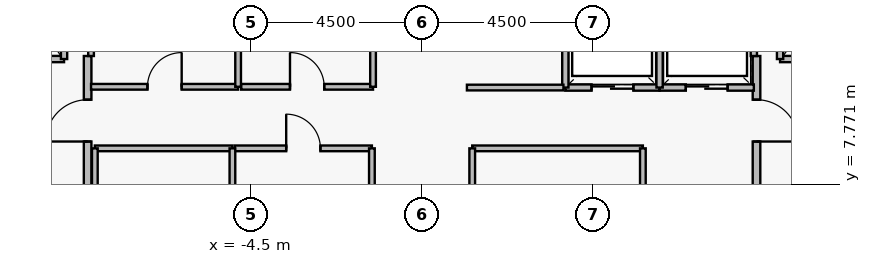
"""IFC4 building model, lengths in metres.
Left out: names, types, materials, properties, quantities, classifications, styles, units other than length and angle.
Written with IfcOpenShell. Run it as: python <this file> out.ifc"""

import sys

from ifc_helpers import new_model, si_unit, direction, frame, frame_2d, origin, place, context, subcontext, project, spatial, rectangle, extrude, element, fill, save


model = new_model("IFC4")
c1 = context("Model", 3, precision=1e-05, world=origin(), true_north=direction((0.0, 1.0)))
c2 = subcontext(c1, "Body", "Model", "MODEL_VIEW")
j1 = project(units=[si_unit("LENGTHUNIT", "METRE"), si_unit("PLANEANGLEUNIT", "RADIAN")], contexts=[c1])
p1 = place(None, origin())
s1 = spatial("IfcSite", under=j1, at=p1, CompositionType="ELEMENT")
p2 = place(p1, origin())
s2 = spatial("IfcBuilding", under=s1, at=p2, CompositionType="ELEMENT")
p3 = place(p2, frame((0.0, 0.0, 265.55)))
s3 = spatial("IfcBuildingStorey", under=s2, at=p3, CompositionType="ELEMENT", Elevation=265.55)
p4 = place(p3, frame((-8.8, 5.05, 0.0), z_axis=(0.0, 0.0, 1.0), x_axis=(0.0, 1.0, 0.0)))
e1 = element("IfcWall", 1, at=p4, inside=s3, PredefinedType="PARTITIONING", context=c2, shape_type="SweptSolid", body=[
    extrude(rectangle(XDim=6.1, YDim=0.2, at=frame_2d((3.05, 0.0))), origin(), (0.0, 0.0, 1.0), 3.48),
])
p5 = place(p4, frame((0.25, 0.0, 0.0)))
e2 = element("IfcOpeningElement", 2, at=p5, cuts=e1, PredefinedType="OPENING", context=c2, shape_type="SweptSolid", body=[
    extrude(rectangle(XDim=1.1, YDim=2.2, at=frame_2d((0.55, 1.1))), frame((0.0, 0.11, 0.0), z_axis=(0.0, -1.0, 0.0), x_axis=(1.0, 0.0, 0.0)), (0.0, 0.0, 1.0), 0.22),
])
p6 = place(p4, frame((3.85, 0.0, 0.0)))
e3 = element("IfcOpeningElement", 3, at=p6, cuts=e1, PredefinedType="OPENING", context=c2, shape_type="SweptSolid", body=[
    extrude(rectangle(XDim=1.1, YDim=2.2, at=frame_2d((0.55, 1.1))), frame((0.0, 0.11, 0.0), z_axis=(0.0, -1.0, 0.0), x_axis=(1.0, 0.0, 0.0)), (0.0, 0.0, 1.0), 0.22),
])
p7 = place(p3, frame((8.8, 11.15, 0.0), z_axis=(0.0, 0.0, 1.0), x_axis=(0.0, -1.0, 0.0)))
e4 = element("IfcWall", 4, at=p7, inside=s3, PredefinedType="PARTITIONING", context=c2, shape_type="SweptSolid", body=[
    extrude(rectangle(XDim=6.1, YDim=0.2, at=frame_2d((3.05, 0.0))), origin(), (0.0, 0.0, 1.0), 3.48),
])
p8 = place(p7, frame((1.15, 0.0, 0.0)))
e5 = element("IfcOpeningElement", 5, at=p8, cuts=e4, PredefinedType="OPENING", context=c2, shape_type="SweptSolid", body=[
    extrude(rectangle(XDim=1.1, YDim=2.2, at=frame_2d((0.55, 1.1))), frame((0.0, 0.11, 0.0), z_axis=(0.0, -1.0, 0.0), x_axis=(1.0, 0.0, 0.0)), (0.0, 0.0, 1.0), 0.22),
])
p9 = place(p7, frame((4.75, 0.0, 0.0)))
e6 = element("IfcOpeningElement", 6, at=p9, cuts=e4, PredefinedType="OPENING", context=c2, shape_type="SweptSolid", body=[
    extrude(rectangle(XDim=1.1, YDim=2.2, at=frame_2d((0.55, 1.1))), frame((0.0, 0.11, 0.0), z_axis=(0.0, -1.0, 0.0), x_axis=(1.0, 0.0, 0.0)), (0.0, 0.0, 1.0), 0.22),
])
p10 = place(p3, frame((-11.58, 11.07, 0.0), z_axis=(0.0, 0.0, 1.0), x_axis=(1.0, 0.0, 0.0)))
e7 = element("IfcWall", 7, at=p10, inside=s3, PredefinedType="PARTITIONING", context=c2, shape_type="SweptSolid", body=[
    extrude(rectangle(XDim=2.16, YDim=0.165, at=frame_2d((1.08, 0.0))), origin(), (0.0, 0.0, 1.0), 3.48),
])
p11 = place(p10, frame((0.53, 0.0, 0.0)))
e8 = element("IfcOpeningElement", 8, at=p11, cuts=e7, PredefinedType="OPENING", context=c2, shape_type="SweptSolid", body=[
    extrude(rectangle(XDim=1.15, YDim=2.25, at=frame_2d((0.575, 1.125))), frame((0.0, 0.093, 0.0), z_axis=(0.0, -1.0, 0.0), x_axis=(1.0, 0.0, 0.0)), (0.0, 0.0, 1.0), 0.185),
])
p12 = place(p3, frame((9.42, 11.07, 0.0), z_axis=(0.0, 0.0, 1.0), x_axis=(1.0, 0.0, 0.0)))
e9 = element("IfcWall", 9, at=p12, inside=s3, PredefinedType="PARTITIONING", context=c2, shape_type="SweptSolid", body=[
    extrude(rectangle(XDim=2.16, YDim=0.165, at=frame_2d((1.08, 0.0))), origin(), (0.0, 0.0, 1.0), 3.48),
])
p13 = place(p12, frame((0.53, 0.0, 0.0)))
e10 = element("IfcOpeningElement", 10, at=p13, cuts=e9, PredefinedType="OPENING", context=c2, shape_type="SweptSolid", body=[
    extrude(rectangle(XDim=1.15, YDim=2.25, at=frame_2d((0.575, 1.125))), frame((0.0, 0.093, 0.0), z_axis=(0.0, -1.0, 0.0), x_axis=(1.0, 0.0, 0.0)), (0.0, 0.0, 1.0), 0.185),
])
p14 = place(p3, frame((3.77, 10.32, 0.0), z_axis=(0.0, 0.0, 1.0), x_axis=(1.0, 0.0, 0.0)))
e11 = element("IfcWall", 11, at=p14, inside=s3, PredefinedType="PARTITIONING", context=c2, shape_type="SweptSolid", body=[
    extrude(rectangle(XDim=2.48, YDim=0.165, at=frame_2d((1.24, 0.0))), origin(), (0.0, 0.0, 1.0), 3.48),
])
p15 = place(p14, frame((0.69, 0.0, 0.0)))
e12 = element("IfcOpeningElement", 12, at=p15, cuts=e11, PredefinedType="OPENING", context=c2, shape_type="SweptSolid", body=[
    extrude(rectangle(XDim=1.1, YDim=2.25, at=frame_2d((0.55, 1.125))), frame((0.0, 0.093, 0.0), z_axis=(0.0, -1.0, 0.0), x_axis=(1.0, 0.0, 0.0)), (0.0, 0.0, 1.0), 0.185),
])
p16 = place(p3, frame((6.25, 10.32, 0.0), z_axis=(0.0, 0.0, 1.0), x_axis=(1.0, 0.0, 0.0)))
e13 = element("IfcWall", 13, at=p16, inside=s3, PredefinedType="PARTITIONING", context=c2, shape_type="SweptSolid", body=[
    extrude(rectangle(XDim=2.48, YDim=0.165, at=frame_2d((1.24, 0.0))), origin(), (0.0, 0.0, 1.0), 3.48),
])
p17 = place(p16, frame((0.69, 0.0, 0.0)))
e14 = element("IfcOpeningElement", 14, at=p17, cuts=e13, PredefinedType="OPENING", context=c2, shape_type="SweptSolid", body=[
    extrude(rectangle(XDim=1.1, YDim=2.25, at=frame_2d((0.55, 1.125))), frame((0.0, 0.093, 0.0), z_axis=(0.0, -1.0, 0.0), x_axis=(1.0, 0.0, 0.0)), (0.0, 0.0, 1.0), 0.185),
])
p18 = place(p3, frame((-8.71, 10.34, 0.0), z_axis=(0.0, 0.0, 1.0), x_axis=(1.0, 0.0, 0.0)))
e15 = element("IfcWall", 15, at=p18, inside=s3, PredefinedType="PARTITIONING", context=c2, shape_type="SweptSolid", body=[
    extrude(rectangle(XDim=3.87, YDim=0.15, at=frame_2d((1.935, 0.0))), origin(), (0.0, 0.0, 1.0), 3.48),
])
p19 = place(p18, frame((1.485, 0.0, 0.0)))
e16 = element("IfcOpeningElement", 16, at=p19, cuts=e15, PredefinedType="OPENING", context=c2, shape_type="SweptSolid", body=[
    extrude(rectangle(XDim=0.9, YDim=2.15, at=frame_2d((0.45, 1.075))), frame((0.0, 0.085, 0.0), z_axis=(0.0, -1.0, 0.0), x_axis=(1.0, 0.0, 0.0)), (0.0, 0.0, 1.0), 0.17),
])
p20 = place(p3, frame((-4.76, 10.34, 0.0), z_axis=(0.0, 0.0, 1.0), x_axis=(1.0, 0.0, 0.0)))
e17 = element("IfcWall", 17, at=p20, inside=s3, PredefinedType="PARTITIONING", context=c2, shape_type="SweptSolid", body=[
    extrude(rectangle(XDim=3.47, YDim=0.15, at=frame_2d((1.735, 0.0))), origin(), (0.0, 0.0, 1.0), 3.48),
])
p21 = place(p20, frame((1.285, 0.0, 0.0)))
e18 = element("IfcOpeningElement", 18, at=p21, cuts=e17, PredefinedType="OPENING", context=c2, shape_type="SweptSolid", body=[
    extrude(rectangle(XDim=0.9, YDim=2.15, at=frame_2d((0.45, 1.075))), frame((0.0, 0.085, 0.0), z_axis=(0.0, -1.0, 0.0), x_axis=(1.0, 0.0, 0.0)), (0.0, 0.0, 1.0), 0.17),
])
p22 = place(p3, frame((-4.93, 8.72, 0.0), z_axis=(0.0, 0.0, 1.0), x_axis=(1.0, 0.0, 0.0)))
e19 = element("IfcWall", 19, at=p22, inside=s3, PredefinedType="PARTITIONING", context=c2, shape_type="SweptSolid", body=[
    extrude(rectangle(XDim=3.61, YDim=0.15, at=frame_2d((1.805, 0.0))), origin(), (0.0, 0.0, 1.0), 3.48),
])
p23 = place(p22, frame((1.355, 0.0, 0.0)))
e20 = element("IfcOpeningElement", 20, at=p23, cuts=e19, PredefinedType="OPENING", context=c2, shape_type="SweptSolid", body=[
    extrude(rectangle(XDim=0.9, YDim=2.15, at=frame_2d((0.45, 1.075))), frame((0.0, 0.085, 0.0), z_axis=(0.0, -1.0, 0.0), x_axis=(1.0, 0.0, 0.0)), (0.0, 0.0, 1.0), 0.17),
])
for number, where, z_axis, x_axis in (
    (21, (-9.42, 11.07, 0.0), (0.0, 0.0, 1.0), (0.0, 1.0, 0.0)),
    (22, (9.42, 11.07, 0.0), (0.0, 0.0, 1.0), (0.0, 1.0, 0.0)),
):
    element("IfcWall", number, at=place(p3, frame(where, z_axis=z_axis, x_axis=x_axis)), inside=s3, PredefinedType="PARTITIONING", context=c2, shape_type="SweptSolid", body=[
        extrude(rectangle(XDim=2.96, YDim=0.165, at=frame_2d((1.48, 0.0))), origin(), (0.0, 0.0, 1.0), 3.48),
    ])
for number, where, z_axis, x_axis in (
    (23, (3.77, 10.32, 0.0), (0.0, 0.0, 1.0), (0.0, 1.0, 0.0)),
    (24, (6.25, 10.32, 0.0), (0.0, 0.0, 1.0), (0.0, 1.0, 0.0)),
):
    element("IfcWall", number, at=place(p3, frame(where, z_axis=z_axis, x_axis=x_axis)), inside=s3, PredefinedType="PARTITIONING", context=c2, shape_type="SweptSolid", body=[
        extrude(rectangle(XDim=2.36, YDim=0.165, at=frame_2d((1.18, 0.0))), origin(), (0.0, 0.0, 1.0), 3.48),
    ])
p24 = place(p3, frame((8.73, 11.15, 0.0), z_axis=(0.0, 0.0, 1.0), x_axis=(0.0, 1.0, 0.0)))
e25 = element("IfcWall", 25, at=p24, inside=s3, PredefinedType="PARTITIONING", context=c2, shape_type="SweptSolid", body=[
    extrude(rectangle(XDim=1.53, YDim=0.165, at=frame_2d((0.765, 0.0))), origin(), (0.0, 0.0, 1.0), 3.48),
])
p25 = place(p3, frame((-8.71, 11.15, 0.0), z_axis=(0.0, 0.0, 1.0), x_axis=(0.0, 1.0, 0.0)))
e26 = element("IfcWall", 26, at=p25, inside=s3, PredefinedType="PARTITIONING", context=c2, shape_type="SweptSolid", body=[
    extrude(rectangle(XDim=1.71, YDim=0.15, at=frame_2d((0.855, 0.0))), origin(), (0.0, 0.0, 1.0), 3.48),
])
for number, where, z_axis, x_axis in (
    (27, (-4.84, 10.34, 0.0), (0.0, 0.0, 1.0), (0.0, 1.0, 0.0)),
    (28, (-1.29, 10.34, 0.0), (0.0, 0.0, 1.0), (0.0, 1.0, 0.0)),
):
    element("IfcWall", number, at=place(p3, frame(where, z_axis=z_axis, x_axis=x_axis)), inside=s3, PredefinedType="PARTITIONING", context=c2, shape_type="SweptSolid", body=[
        extrude(rectangle(XDim=2.52, YDim=0.15, at=frame_2d((1.26, 0.0))), origin(), (0.0, 0.0, 1.0), 3.48),
    ])
p26 = place(p3, frame((-8.61, 8.72, 0.0), z_axis=(0.0, 0.0, 1.0), x_axis=(1.0, 0.0, 0.0)))
e29 = element("IfcWall", 29, at=p26, inside=s3, PredefinedType="PARTITIONING", context=c2, shape_type="SweptSolid", body=[
    extrude(rectangle(XDim=3.62, YDim=0.15, at=frame_2d((1.81, 0.0))), origin(), (0.0, 0.0, 1.0), 3.48),
])
for number, where, z_axis, x_axis in (
    (30, (-8.61, 6.48, 0.0), (0.0, 0.0, 1.0), (0.0, 1.0, 0.0)),
    (31, (-4.99, 6.48, 0.0), (0.0, 0.0, 1.0), (0.0, 1.0, 0.0)),
    (32, (-1.32, 6.48, 0.0), (0.0, 0.0, 1.0), (0.0, 1.0, 0.0)),
):
    element("IfcWall", number, at=place(p3, frame(where, z_axis=z_axis, x_axis=x_axis)), inside=s3, PredefinedType="PARTITIONING", context=c2, shape_type="SweptSolid", body=[
        extrude(rectangle(XDim=2.24, YDim=0.15, at=frame_2d((1.12, 0.0))), origin(), (0.0, 0.0, 1.0), 3.48),
    ])
p27 = place(p3, frame((1.32, 8.72, 0.0), z_axis=(0.0, 0.0, 1.0), x_axis=(1.0, 0.0, 0.0)))
e33 = element("IfcWall", 33, at=p27, inside=s3, PredefinedType="PARTITIONING", context=c2, shape_type="SweptSolid", body=[
    extrude(rectangle(XDim=4.49, YDim=0.15, at=frame_2d((2.245, 0.0))), origin(), (0.0, 0.0, 1.0), 3.48),
])
for number, where, z_axis, x_axis in (
    (34, (1.32, 6.48, 0.0), (0.0, 0.0, 1.0), (0.0, 1.0, 0.0)),
    (35, (5.81, 6.48, 0.0), (0.0, 0.0, 1.0), (0.0, 1.0, 0.0)),
):
    element("IfcWall", number, at=place(p3, frame(where, z_axis=z_axis, x_axis=x_axis)), inside=s3, PredefinedType="PARTITIONING", context=c2, shape_type="SweptSolid", body=[
        extrude(rectangle(XDim=2.24, YDim=0.15, at=frame_2d((1.12, 0.0))), origin(), (0.0, 0.0, 1.0), 3.48),
    ])
p28 = place(p3, frame((1.18, 10.32, 0.0), z_axis=(0.0, 0.0, 1.0), x_axis=(1.0, 0.0, 0.0)))
e36 = element("IfcWall", 36, at=p28, inside=s3, PredefinedType="PARTITIONING", context=c2, shape_type="SweptSolid", body=[
    extrude(rectangle(XDim=2.54, YDim=0.15, at=frame_2d((1.27, 0.0))), origin(), (0.0, 0.0, 1.0), 3.48),
])
p29 = place(p6, origin())
e37 = element("IfcDoor", 37, at=p29, inside=s3, OperationType="SINGLE_SWING_LEFT", PredefinedType="DOOR", context=c2, shape_type="SweptSolid", body=[
    extrude(rectangle(XDim=1.1, YDim=2.2, at=frame_2d((0.55, 1.1))), frame((0.0, 0.025, 0.0), z_axis=(0.0, -1.0, 0.0), x_axis=(1.0, 0.0, 0.0)), (0.0, 0.0, 1.0), 0.05),
])
fill(e3, e37)
p30 = place(p8, origin())
e38 = element("IfcDoor", 38, at=p30, inside=s3, OperationType="SINGLE_SWING_RIGHT", PredefinedType="DOOR", context=c2, shape_type="SweptSolid", body=[
    extrude(rectangle(XDim=1.1, YDim=2.2, at=frame_2d((0.55, 1.1))), frame((0.0, 0.025, 0.0), z_axis=(0.0, -1.0, 0.0), x_axis=(1.0, 0.0, 0.0)), (0.0, 0.0, 1.0), 0.05),
])
fill(e5, e38)
p31 = place(p15, origin())
e39 = element("IfcDoor", 39, at=p31, inside=s3, OperationType="SLIDING_TO_LEFT", PredefinedType="DOOR", context=c2, shape_type="SweptSolid", body=[
    extrude(rectangle(XDim=1.1, YDim=2.25, at=frame_2d((0.55, 1.125))), frame((0.0, 0.025, 0.0), z_axis=(0.0, -1.0, 0.0), x_axis=(1.0, 0.0, 0.0)), (0.0, 0.0, 1.0), 0.05),
])
fill(e12, e39)
p32 = place(p17, origin())
e40 = element("IfcDoor", 40, at=p32, inside=s3, OperationType="SLIDING_TO_LEFT", PredefinedType="DOOR", context=c2, shape_type="SweptSolid", body=[
    extrude(rectangle(XDim=1.1, YDim=2.25, at=frame_2d((0.55, 1.125))), frame((0.0, 0.025, 0.0), z_axis=(0.0, -1.0, 0.0), x_axis=(1.0, 0.0, 0.0)), (0.0, 0.0, 1.0), 0.05),
])
fill(e14, e40)
p33 = place(p19, origin())
e41 = element("IfcDoor", 41, at=p33, inside=s3, OperationType="SINGLE_SWING_RIGHT", PredefinedType="DOOR", context=c2, shape_type="SweptSolid", body=[
    extrude(rectangle(XDim=0.9, YDim=2.15, at=frame_2d((0.45, 1.075))), frame((0.0, 0.025, 0.0), z_axis=(0.0, -1.0, 0.0), x_axis=(1.0, 0.0, 0.0)), (0.0, 0.0, 1.0), 0.05),
])
fill(e16, e41)
p34 = place(p21, origin())
e42 = element("IfcDoor", 42, at=p34, inside=s3, OperationType="SINGLE_SWING_LEFT", PredefinedType="DOOR", context=c2, shape_type="SweptSolid", body=[
    extrude(rectangle(XDim=0.9, YDim=2.15, at=frame_2d((0.45, 1.075))), frame((0.0, 0.025, 0.0), z_axis=(0.0, -1.0, 0.0), x_axis=(1.0, 0.0, 0.0)), (0.0, 0.0, 1.0), 0.05),
])
fill(e18, e42)
p35 = place(p23, origin())
e43 = element("IfcDoor", 43, at=p35, inside=s3, OperationType="SINGLE_SWING_LEFT", PredefinedType="DOOR", context=c2, shape_type="SweptSolid", body=[
    extrude(rectangle(XDim=0.9, YDim=2.15, at=frame_2d((0.45, 1.075))), frame((0.0, 0.025, 0.0), z_axis=(0.0, -1.0, 0.0), x_axis=(1.0, 0.0, 0.0)), (0.0, 0.0, 1.0), 0.05),
])
fill(e20, e43)
save(model, sys.argv[1])
